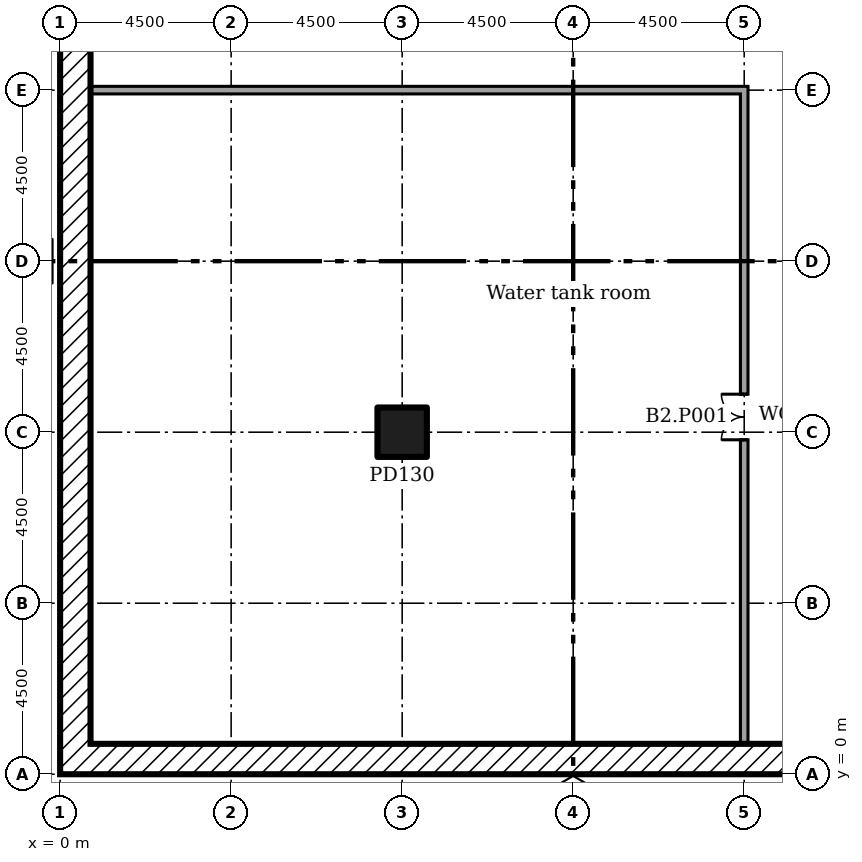
"""IFC4 building model, lengths in metres.
Left out: names, types, materials, properties, quantities, classifications, styles, units other than length and angle.
Written with IfcOpenShell. Run it as: python <this file> out.ifc"""

import sys

from ifc_helpers import new_model, si_unit, direction, frame, frame_2d, origin, origin_2d, place, context, subcontext, project, spatial, rectangle, extrude, element, fill, save


model = new_model("IFC4")
c1 = context("Model", 3, precision=1e-05, world=origin(), true_north=direction((0.0, 1.0)))
c2 = subcontext(c1, "Body", "Model", "MODEL_VIEW")
j1 = project(units=[si_unit("LENGTHUNIT", "METRE"), si_unit("PLANEANGLEUNIT", "RADIAN")], contexts=[c1])
p1 = place(None, origin())
s1 = spatial("IfcSite", under=j1, at=p1, CompositionType="ELEMENT")
p2 = place(p1, origin())
s2 = spatial("IfcBuilding", under=s1, at=p2, CompositionType="ELEMENT")
p3 = place(p2, frame((0.0, 0.0, -8.0)))
s3 = spatial("IfcBuildingStorey", under=s2, at=p3, CompositionType="ELEMENT", Elevation=-8.0)
p4 = place(p3, frame((9.0, 9.0, 0.0)))
e1 = element("IfcColumn", 1, at=p4, inside=s3, PredefinedType="COLUMN", context=c2, shape_type="SweptSolid", body=[
    extrude(rectangle(XDim=1.3, YDim=1.3, at=origin_2d()), origin(), (0.0, 0.0, 1.0), 4.0),
])
p5 = place(p3, frame((0.0, 0.4, 0.0)))
e2 = element("IfcWall", 2, at=p5, inside=s3, PredefinedType="SOLIDWALL", context=c2, shape_type="SweptSolid", body=[
    extrude(rectangle(XDim=153.0, YDim=0.8, at=frame_2d((76.5, 0.0))), origin(), (0.0, 0.0, 1.0), 4.0),
])
p6 = place(p3, frame((0.4, 0.8, 0.0), z_axis=(0.0, 0.0, 1.0), x_axis=(0.0, 1.0, 0.0)))
e3 = element("IfcWall", 3, at=p6, inside=s3, PredefinedType="SOLIDWALL", context=c2, shape_type="SweptSolid", body=[
    extrude(rectangle(XDim=97.4, YDim=0.8, at=frame_2d((48.7, 0.0))), origin(), (0.0, 0.0, 1.0), 4.0),
])
p7 = place(p3, frame((18.0, 0.8, 0.0), z_axis=(0.0, 0.0, 1.0), x_axis=(0.0, 1.0, 0.0)))
e4 = element("IfcWall", 4, at=p7, inside=s3, PredefinedType="SOLIDWALL", context=c2, shape_type="SweptSolid", body=[
    extrude(rectangle(XDim=17.3, YDim=0.2, at=frame_2d((8.65, 0.0))), origin(), (0.0, 0.0, 1.0), 3.55),
])
p8 = place(p7, frame((8.0, 0.0, 0.0)))
e5 = element("IfcOpeningElement", 5, at=p8, cuts=e4, PredefinedType="OPENING", context=c2, shape_type="SweptSolid", body=[
    extrude(rectangle(XDim=1.2, YDim=2.1, at=frame_2d((0.6, 1.05))), frame((0.0, 0.11, 0.0), z_axis=(0.0, -1.0, 0.0), x_axis=(1.0, 0.0, 0.0)), (0.0, 0.0, 1.0), 0.22),
])
p9 = place(p3, frame((0.8, 18.0, 0.0)))
e6 = element("IfcWall", 6, at=p9, inside=s3, PredefinedType="SOLIDWALL", context=c2, shape_type="SweptSolid", body=[
    extrude(rectangle(XDim=17.1, YDim=0.2, at=frame_2d((8.55, 0.0))), origin(), (0.0, 0.0, 1.0), 3.55),
])
p10 = place(p8, origin())
e7 = element("IfcDoor", 7, at=p10, inside=s3, OperationType="DOUBLE_DOOR_SINGLE_SWING", PredefinedType="DOOR", context=c2, shape_type="SweptSolid", body=[
    extrude(rectangle(XDim=1.2, YDim=2.1, at=frame_2d((0.6, 1.05))), frame((0.0, 0.025, 0.0), z_axis=(0.0, -1.0, 0.0), x_axis=(1.0, 0.0, 0.0)), (0.0, 0.0, 1.0), 0.05),
])
fill(e5, e7)
save(model, sys.argv[1])
